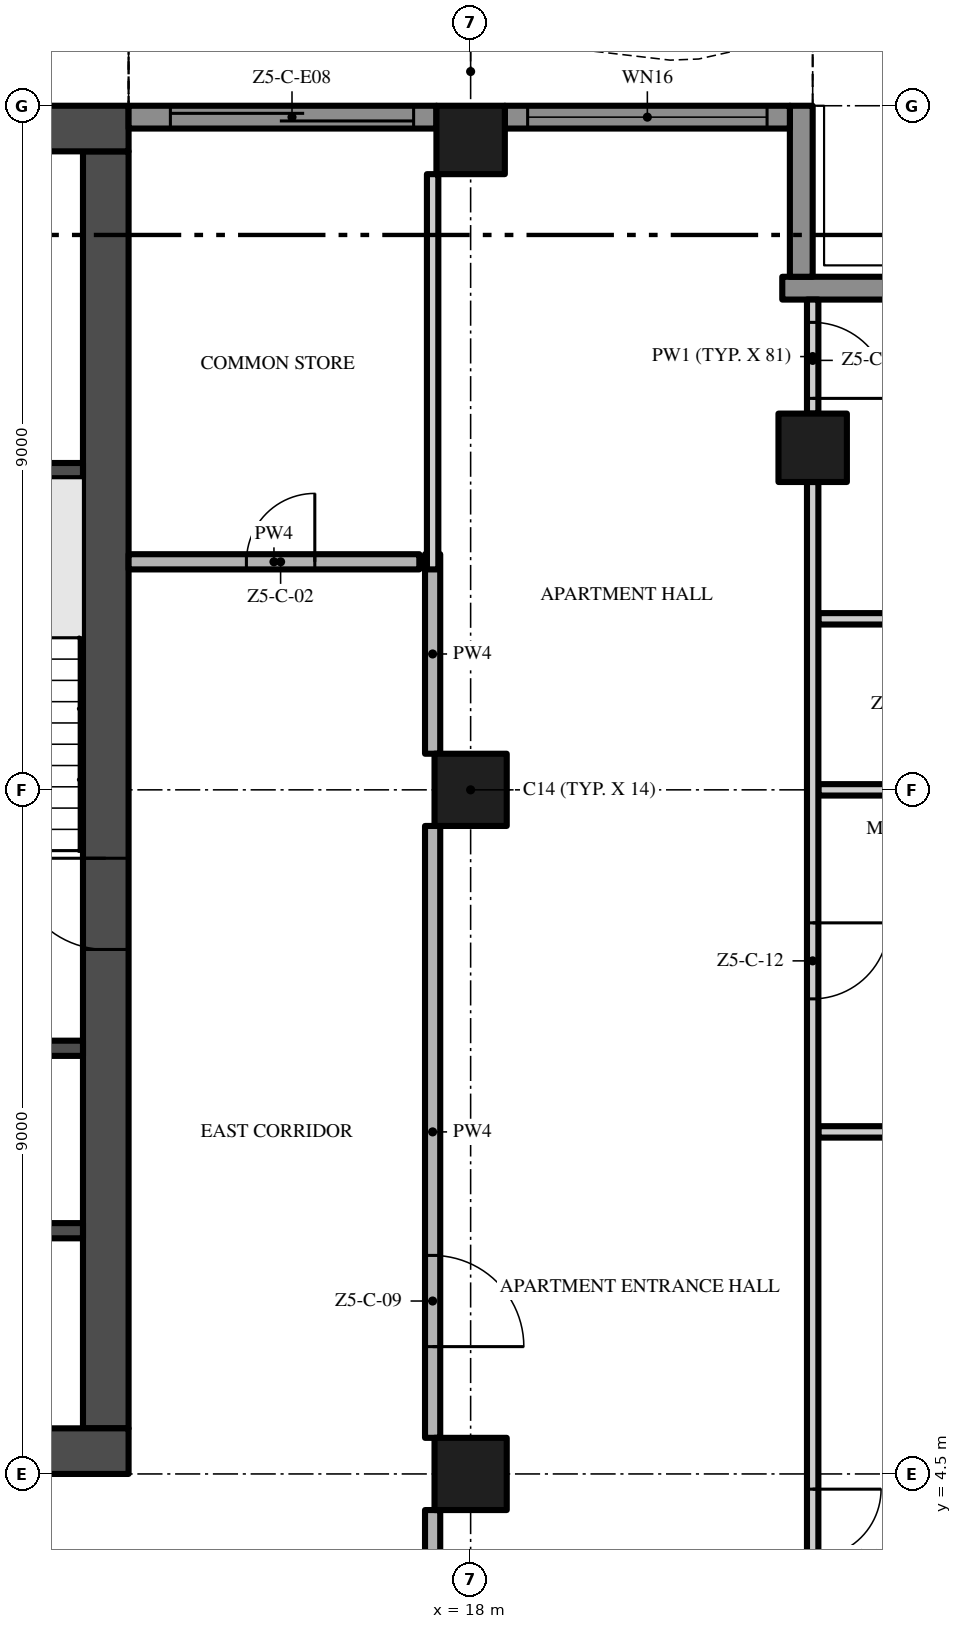
"""IFC4 building model, lengths in metres.
Left out: names, types, materials, properties, quantities, classifications, styles, units other than length and angle.
Written with IfcOpenShell. Run it as: python <this file> out.ifc"""

import sys

from ifc_helpers import new_model, si_unit, direction, frame, frame_2d, origin, origin_2d, place, context, subcontext, project, spatial, polyline, rectangle, outline, extrude, element, fill, save


model = new_model("IFC4")
c1 = context("Model", 3, precision=1e-05, world=origin(), true_north=direction((0.0, 1.0)))
c2 = subcontext(c1, "Body", "Model", "MODEL_VIEW")
j1 = project(units=[si_unit("LENGTHUNIT", "METRE"), si_unit("PLANEANGLEUNIT", "RADIAN")], contexts=[c1])
p1 = place(None, origin())
s1 = spatial("IfcSite", under=j1, at=p1, CompositionType="ELEMENT")
p2 = place(p1, origin())
s2 = spatial("IfcBuilding", under=s1, at=p2, CompositionType="ELEMENT")
p3 = place(p2, frame((0.0, 0.0, 261.6)))
s3 = spatial("IfcBuildingStorey", under=s2, at=p3, CompositionType="ELEMENT", Elevation=261.6)
p4 = place(p3, frame((-13.5, 4.8, -0.3), z_axis=(0.0, 0.0, 1.0), x_axis=(1.0, 0.0, 0.0)))
e1 = element("IfcWall", 1, at=p4, inside=s3, PredefinedType="SHEAR", context=c2, shape_type="SweptSolid", body=[
    extrude(rectangle(XDim=27.0, YDim=0.6, at=frame_2d((13.5, 0.0))), origin(), (0.0, 0.0, 1.0), 3.8),
])
p5 = place(p4, frame((12.0, 0.0, 0.3)))
e2 = element("IfcOpeningElement", 2, at=p5, cuts=e1, PredefinedType="OPENING", context=c2, shape_type="SweptSolid", body=[
    extrude(rectangle(XDim=3.0, YDim=2.4, at=frame_2d((1.5, 1.2))), frame((0.0, 0.31, 0.0), z_axis=(0.0, -1.0, 0.0), x_axis=(1.0, 0.0, 0.0)), (0.0, 0.0, 1.0), 0.62),
])
p6 = place(p4, frame((4.9, 0.0, 0.3)))
e3 = element("IfcOpeningElement", 3, at=p6, cuts=e1, PredefinedType="OPENING", context=c2, shape_type="SweptSolid", body=[
    extrude(rectangle(XDim=1.2, YDim=2.2, at=frame_2d((0.6, 1.1))), frame((0.0, 0.31, 0.0), z_axis=(0.0, -1.0, 0.0), x_axis=(1.0, 0.0, 0.0)), (0.0, 0.0, 1.0), 0.62),
])
p7 = place(p4, frame((20.75, 0.0, 0.3)))
e4 = element("IfcOpeningElement", 4, at=p7, cuts=e1, PredefinedType="OPENING", context=c2, shape_type="SweptSolid", body=[
    extrude(rectangle(XDim=1.5, YDim=2.2, at=frame_2d((0.75, 1.1))), frame((0.0, 0.31, 0.0), z_axis=(0.0, -1.0, 0.0), x_axis=(1.0, 0.0, 0.0)), (0.0, 0.0, 1.0), 0.62),
])
p8 = place(p4, frame((17.4, 0.0, 0.3)))
e5 = element("IfcOpeningElement", 5, at=p8, cuts=e1, PredefinedType="OPENING", context=c2, shape_type="SweptSolid", body=[
    extrude(rectangle(XDim=1.2, YDim=2.2, at=frame_2d((0.6, 1.1))), frame((0.0, 0.31, 0.0), z_axis=(0.0, -1.0, 0.0), x_axis=(1.0, 0.0, 0.0)), (0.0, 0.0, 1.0), 0.62),
])
p9 = place(p3, frame((13.2, 5.1, -0.3), z_axis=(0.0, 0.0, 1.0), x_axis=(0.0, 1.0, 0.0)))
e6 = element("IfcWall", 6, at=p9, inside=s3, PredefinedType="SHEAR", context=c2, shape_type="SweptSolid", body=[
    extrude(rectangle(XDim=16.8, YDim=0.6, at=frame_2d((8.4, 0.0))), origin(), (0.0, 0.0, 1.0), 3.8),
])
p10 = place(p9, frame((6.3, 0.0, 0.3)))
e7 = element("IfcOpeningElement", 7, at=p10, cuts=e6, PredefinedType="OPENING", context=c2, shape_type="SweptSolid", body=[
    extrude(rectangle(XDim=1.2, YDim=2.2, at=frame_2d((0.6, 1.1))), frame((0.0, 0.31, 0.0), z_axis=(0.0, -1.0, 0.0), x_axis=(1.0, 0.0, 0.0)), (0.0, 0.0, 1.0), 0.62),
])
p11 = place(p3, frame((13.5, 22.2, -0.3), z_axis=(0.0, 0.0, 1.0), x_axis=(-1.0, 0.0, 0.0)))
e8 = element("IfcWall", 8, at=p11, inside=s3, PredefinedType="SHEAR", context=c2, shape_type="SweptSolid", body=[
    extrude(rectangle(XDim=27.0, YDim=0.6, at=frame_2d((13.5, 0.0))), origin(), (0.0, 0.0, 1.0), 3.8),
])
p12 = place(p3, frame((18.0, 13.5, 0.0), z_axis=(0.0, 0.0, 1.0), x_axis=(1.0, 0.0, 0.0)))
e9 = element("IfcColumn", 9, at=p12, inside=s3, PredefinedType="COLUMN", context=c2, shape_type="SweptSolid", body=[
    extrude(rectangle(XDim=0.95, YDim=0.95, at=origin_2d()), origin(), (0.0, 0.0, 1.0), 3.5),
])
p13 = place(p3, frame((18.0, 22.05, 0.0), z_axis=(0.0, 0.0, 1.0), x_axis=(1.0, 0.0, 0.0)))
e10 = element("IfcColumn", 10, at=p13, inside=s3, PredefinedType="COLUMN", context=c2, shape_type="SweptSolid", body=[
    extrude(rectangle(XDim=0.9, YDim=0.9, at=origin_2d()), origin(), (0.0, 0.0, 1.0), 3.5),
])
p14 = place(p3, frame((18.0, 4.5, 0.0), z_axis=(0.0, 0.0, 1.0), x_axis=(1.0, 0.0, 0.0)))
e11 = element("IfcColumn", 11, at=p14, inside=s3, PredefinedType="COLUMN", context=c2, shape_type="SweptSolid", body=[
    extrude(rectangle(XDim=0.95, YDim=0.95, at=origin_2d()), origin(), (0.0, 0.0, 1.0), 3.5),
])
p15 = place(p3, frame((22.5, 18.0, 0.0), z_axis=(0.0, 0.0, 1.0), x_axis=(1.0, 0.0, 0.0)))
e12 = element("IfcColumn", 12, at=p15, inside=s3, PredefinedType="COLUMN", context=c2, shape_type="SweptSolid", body=[
    extrude(rectangle(XDim=0.9, YDim=0.9, at=origin_2d()), origin(), (0.0, 0.0, 1.0), 3.5),
])
p16 = place(p3, frame((22.1, 20.1, 0.0), z_axis=(0.0, 0.0, 1.0), x_axis=(1.0, 0.0, 0.0)))
e13 = element("IfcWall", 13, at=p16, inside=s3, PredefinedType="SOLIDWALL", context=c2, shape_type="SweptSolid", body=[
    extrude(rectangle(XDim=2.35, YDim=0.3, at=frame_2d((1.175, 0.0))), origin(), (0.0, 0.0, 1.0), 3.5),
])
p17 = place(p3, frame((22.35, 22.5, 0.0), z_axis=(0.0, 0.0, 1.0), x_axis=(0.0, -1.0, 0.0)))
e14 = element("IfcWall", 14, at=p17, inside=s3, PredefinedType="SOLIDWALL", context=c2, shape_type="SweptSolid", body=[
    extrude(rectangle(XDim=2.25, YDim=0.3, at=frame_2d((1.125, 0.0))), origin(), (0.0, 0.0, 1.0), 3.5),
])
p18 = place(p3, frame((18.45, 22.35, 0.0), z_axis=(0.0, 0.0, 1.0), x_axis=(1.0, 0.0, 0.0)))
e15 = element("IfcWall", 15, at=p18, inside=s3, PredefinedType="SOLIDWALL", context=c2, shape_type="SweptSolid", body=[
    extrude(rectangle(XDim=3.75, YDim=0.3, at=frame_2d((1.875, 0.0))), origin(), (0.0, 0.0, 1.0), 3.5),
])
p19 = place(p18, frame((0.3, 0.0, 0.45)))
e16 = element("IfcOpeningElement", 16, at=p19, cuts=e15, PredefinedType="OPENING", context=c2, shape_type="SweptSolid", body=[
    extrude(rectangle(XDim=3.15, YDim=2.65, at=frame_2d((1.575, 1.325))), frame((0.0, 0.16, 0.0), z_axis=(0.0, -1.0, 0.0), x_axis=(1.0, 0.0, 0.0)), (0.0, 0.0, 1.0), 0.32),
])
p20 = place(p3, frame((13.5, 22.35, 0.0), z_axis=(0.0, 0.0, 1.0), x_axis=(1.0, 0.0, 0.0)))
e17 = element("IfcWall", 17, at=p20, inside=s3, PredefinedType="SOLIDWALL", context=c2, shape_type="SweptSolid", body=[
    extrude(rectangle(XDim=4.05, YDim=0.3, at=frame_2d((2.025, 0.0))), origin(), (0.0, 0.0, 1.0), 3.5),
])
p21 = place(p20, frame((0.55, 0.0, 0.0)))
e18 = element("IfcOpeningElement", 18, at=p21, cuts=e17, PredefinedType="OPENING", context=c2, shape_type="SweptSolid", body=[
    extrude(rectangle(XDim=3.2, YDim=2.4, at=frame_2d((1.6, 1.2))), frame((0.0, 0.16, 0.0), z_axis=(0.0, -1.0, 0.0), x_axis=(1.0, 0.0, 0.0)), (0.0, 0.0, 1.0), 0.32),
])
p22 = place(p3, origin())
e19 = element("IfcWall", 19, at=p22, inside=s3, PredefinedType="USERDEFINED", context=c2, shape_type="SweptSolid", body=[
    extrude(outline(polyline([(22.5, 23.451), (21.0, 23.115), (20.625, 23.1), (19.5, 23.231), (18.0, 23.755), (16.5, 24.488), (15.0, 25.149), (13.5, 25.485), (13.445, 25.241), (14.921, 24.91), (16.395, 24.261), (17.904, 23.524), (19.444, 22.986), (20.615, 22.849), (21.033, 22.866), (22.555, 23.208), (22.5, 23.451)])), origin(), (0.0, 0.0, 1.0), 0.9),
])
for number, where, z_axis, x_axis in (
    (20, (9.65, 7.7, 0.0), (0.0, 0.0, 1.0), (1.0, 0.0, 0.0)),
    (21, (9.65, 10.1, 0.0), (0.0, 0.0, 1.0), (1.0, 0.0, 0.0)),
    (22, (9.65, 17.7, 0.0), (0.0, 0.0, 1.0), (1.0, 0.0, 0.0)),
):
    element("IfcWall", number, at=place(p3, frame(where, z_axis=z_axis, x_axis=x_axis)), inside=s3, PredefinedType="SHEAR", context=c2, shape_type="SweptSolid", body=[
        extrude(rectangle(XDim=3.25, YDim=0.2, at=frame_2d((1.625, 0.0))), origin(), (0.0, 0.0, 1.0), 3.5),
    ])
p23 = place(p3, frame((22.575, 9.0, 0.0), z_axis=(0.0, 0.0, 1.0), x_axis=(1.0, 0.0, 0.0)))
e23 = element("IfcWall", 23, at=p23, inside=s3, PredefinedType="PARTITIONING", context=c2, shape_type="SweptSolid", body=[
    extrude(rectangle(XDim=4.125, YDim=0.15, at=frame_2d((2.062, 0.0))), origin(), (0.0, 0.0, 1.0), 3.5),
])
p24 = place(p3, frame((22.575, 13.5, 0.0), z_axis=(0.0, 0.0, 1.0), x_axis=(1.0, 0.0, 0.0)))
e24 = element("IfcWall", 24, at=p24, inside=s3, PredefinedType="PARTITIONING", context=c2, shape_type="SweptSolid", body=[
    extrude(rectangle(XDim=3.525, YDim=0.15, at=frame_2d((1.762, 0.0))), origin(), (0.0, 0.0, 1.0), 3.5),
])
p25 = place(p3, frame((22.575, 15.75, 0.0), z_axis=(0.0, 0.0, 1.0), x_axis=(1.0, 0.0, 0.0)))
e25 = element("IfcWall", 25, at=p25, inside=s3, PredefinedType="PARTITIONING", context=c2, shape_type="SweptSolid", body=[
    extrude(rectangle(XDim=1.875, YDim=0.15, at=frame_2d((0.938, 0.0))), origin(), (0.0, 0.0, 1.0), 3.5),
])
p26 = place(p3, frame((13.5, 16.5, 0.0), z_axis=(0.0, 0.0, 1.0), x_axis=(1.0, 0.0, 0.0)))
e26 = element("IfcWall", 26, at=p26, inside=s3, PredefinedType="PARTITIONING", context=c2, shape_type="SweptSolid", body=[
    extrude(rectangle(XDim=3.825, YDim=0.2, at=frame_2d((1.913, 0.0))), origin(), (0.0, 0.0, 1.0), 3.5),
])
p27 = place(p26, frame((1.55, 0.0, 0.0)))
e27 = element("IfcOpeningElement", 27, at=p27, cuts=e26, PredefinedType="OPENING", context=c2, shape_type="SweptSolid", body=[
    extrude(rectangle(XDim=0.9, YDim=2.1, at=frame_2d((0.45, 1.05))), frame((0.0, 0.11, 0.0), z_axis=(0.0, -1.0, 0.0), x_axis=(1.0, 0.0, 0.0)), (0.0, 0.0, 1.0), 0.22),
])
p28 = place(p3, frame((17.5, -0.2, 0.0), z_axis=(0.0, 0.0, 1.0), x_axis=(0.0, 1.0, 0.0)))
e28 = element("IfcWall", 28, at=p28, inside=s3, PredefinedType="PARTITIONING", context=c2, shape_type="SweptSolid", body=[
    extrude(rectangle(XDim=4.225, YDim=0.2, at=frame_2d((2.112, 0.0))), origin(), (0.0, 0.0, 1.0), 3.5),
])
p29 = place(p3, frame((17.5, 13.025, 0.0), z_axis=(0.0, 0.0, 1.0), x_axis=(0.0, -1.0, 0.0)))
e29 = element("IfcWall", 29, at=p29, inside=s3, PredefinedType="PARTITIONING", context=c2, shape_type="SweptSolid", body=[
    extrude(rectangle(XDim=8.05, YDim=0.2, at=frame_2d((4.025, 0.0))), origin(), (0.0, 0.0, 1.0), 3.5),
])
p30 = place(p29, frame((5.65, 0.0, 0.0)))
e30 = element("IfcOpeningElement", 30, at=p30, cuts=e29, PredefinedType="OPENING", context=c2, shape_type="SweptSolid", body=[
    extrude(rectangle(XDim=1.2, YDim=2.4, at=frame_2d((0.6, 1.2))), frame((0.0, 0.11, 0.0), z_axis=(0.0, -1.0, 0.0), x_axis=(1.0, 0.0, 0.0)), (0.0, 0.0, 1.0), 0.22),
])
p31 = place(p3, frame((17.5, 13.975, 0.0), z_axis=(0.0, 0.0, 1.0), x_axis=(0.0, 1.0, 0.0)))
e31 = element("IfcWall", 31, at=p31, inside=s3, PredefinedType="PARTITIONING", context=c2, shape_type="SweptSolid", body=[
    extrude(rectangle(XDim=2.625, YDim=0.2, at=frame_2d((1.312, 0.0))), origin(), (0.0, 0.0, 1.0), 3.5),
])
p32 = place(p3, frame((17.5, 16.4, 0.0), z_axis=(0.0, 0.0, 1.0), x_axis=(0.0, 1.0, 0.0)))
e32 = element("IfcWall", 32, at=p32, inside=s3, PredefinedType="PARTITIONING", context=c2, shape_type="SweptSolid", body=[
    extrude(rectangle(XDim=5.2, YDim=0.15, at=frame_2d((2.6, 0.0))), origin(), (0.0, 0.0, 1.0), 3.5),
])
p33 = place(p3, frame((22.5, 17.55, 0.0), z_axis=(0.0, 0.0, 1.0), x_axis=(0.0, -1.0, 0.0)))
e33 = element("IfcWall", 33, at=p33, inside=s3, PredefinedType="PARTITIONING", context=c2, shape_type="SweptSolid", body=[
    extrude(rectangle(XDim=17.45, YDim=0.15, at=frame_2d((8.725, 0.0))), origin(), (0.0, 0.0, 1.0), 3.5),
])
p34 = place(p33, frame((13.25, 0.0, 0.0)))
e34 = element("IfcOpeningElement", 34, at=p34, cuts=e33, PredefinedType="OPENING", context=c2, shape_type="SweptSolid", body=[
    extrude(rectangle(XDim=1.8, YDim=2.4, at=frame_2d((0.9, 1.2))), frame((0.0, 0.085, 0.0), z_axis=(0.0, -1.0, 0.0), x_axis=(1.0, 0.0, 0.0)), (0.0, 0.0, 1.0), 0.17),
])
p35 = place(p33, frame((5.8, 0.0, 0.0)))
e35 = element("IfcOpeningElement", 35, at=p35, cuts=e33, PredefinedType="OPENING", context=c2, shape_type="SweptSolid", body=[
    extrude(rectangle(XDim=1.0, YDim=2.4, at=frame_2d((0.5, 1.2))), frame((0.0, 0.085, 0.0), z_axis=(0.0, -1.0, 0.0), x_axis=(1.0, 0.0, 0.0)), (0.0, 0.0, 1.0), 0.17),
])
p36 = place(p3, frame((22.5, 19.95, 0.0), z_axis=(0.0, 0.0, 1.0), x_axis=(0.0, -1.0, 0.0)))
e36 = element("IfcWall", 36, at=p36, inside=s3, PredefinedType="PARTITIONING", context=c2, shape_type="SweptSolid", body=[
    extrude(rectangle(XDim=1.5, YDim=0.15, at=frame_2d((0.75, 0.0))), origin(), (0.0, 0.0, 1.0), 3.5),
])
p37 = place(p36, frame((0.3, 0.0, 0.0)))
e37 = element("IfcOpeningElement", 37, at=p37, cuts=e36, PredefinedType="OPENING", context=c2, shape_type="SweptSolid", body=[
    extrude(rectangle(XDim=1.0, YDim=2.4, at=frame_2d((0.5, 1.2))), frame((0.0, 0.085, 0.0), z_axis=(0.0, -1.0, 0.0), x_axis=(1.0, 0.0, 0.0)), (0.0, 0.0, 1.0), 0.17),
])
p38 = place(p19, origin())
e38 = element("IfcWindow", 38, at=p38, inside=s3, PartitioningType="SINGLE_PANEL", PredefinedType="WINDOW", context=c2, shape_type="SweptSolid", body=[
    extrude(rectangle(XDim=3.15, YDim=2.65, at=frame_2d((1.575, 1.325))), frame((0.0, 0.03, 0.0), z_axis=(0.0, -1.0, 0.0), x_axis=(1.0, 0.0, 0.0)), (0.0, 0.0, 1.0), 0.06),
])
fill(e16, e38)
p39 = place(p21, origin())
e39 = element("IfcDoor", 39, at=p39, inside=s3, OperationType="SINGLE_SWING_LEFT", PredefinedType="DOOR", context=c2, shape_type="SweptSolid", body=[
    extrude(rectangle(XDim=3.2, YDim=2.4, at=frame_2d((1.6, 1.2))), frame((0.0, 0.025, 0.0), z_axis=(0.0, -1.0, 0.0), x_axis=(1.0, 0.0, 0.0)), (0.0, 0.0, 1.0), 0.05),
])
fill(e18, e39)
p40 = place(p10, frame((1.2, 0.0, 0.0), z_axis=(0.0, 0.0, 1.0), x_axis=(-1.0, 0.0, 0.0)))
e40 = element("IfcDoor", 40, at=p40, inside=s3, OperationType="SINGLE_SWING_LEFT", PredefinedType="DOOR", context=c2, shape_type="SweptSolid", body=[
    extrude(rectangle(XDim=1.2, YDim=2.2, at=frame_2d((0.6, 1.1))), frame((0.0, 0.025, 0.0), z_axis=(0.0, -1.0, 0.0), x_axis=(1.0, 0.0, 0.0)), (0.0, 0.0, 1.0), 0.05),
])
fill(e7, e40)
p41 = place(p27, origin())
e41 = element("IfcDoor", 41, at=p41, inside=s3, OperationType="SINGLE_SWING_RIGHT", PredefinedType="DOOR", context=c2, shape_type="SweptSolid", body=[
    extrude(rectangle(XDim=0.9, YDim=2.1, at=frame_2d((0.45, 1.05))), frame((0.0, 0.025, 0.0), z_axis=(0.0, -1.0, 0.0), x_axis=(1.0, 0.0, 0.0)), (0.0, 0.0, 1.0), 0.05),
])
fill(e27, e41)
p42 = place(p30, origin())
e42 = element("IfcDoor", 42, at=p42, inside=s3, OperationType="SINGLE_SWING_RIGHT", PredefinedType="DOOR", context=c2, shape_type="SweptSolid", body=[
    extrude(rectangle(XDim=1.2, YDim=2.4, at=frame_2d((0.6, 1.2))), frame((0.0, 0.025, 0.0), z_axis=(0.0, -1.0, 0.0), x_axis=(1.0, 0.0, 0.0)), (0.0, 0.0, 1.0), 0.05),
])
fill(e30, e42)
p43 = place(p34, origin())
e43 = element("IfcDoor", 43, at=p43, inside=s3, OperationType="DOUBLE_DOOR_SINGLE_SWING", PredefinedType="DOOR", context=c2, shape_type="SweptSolid", body=[
    extrude(rectangle(XDim=1.8, YDim=2.4, at=frame_2d((0.9, 1.2))), frame((0.0, 0.025, 0.0), z_axis=(0.0, -1.0, 0.0), x_axis=(1.0, 0.0, 0.0)), (0.0, 0.0, 1.0), 0.05),
])
fill(e34, e43)
p44 = place(p35, origin())
e44 = element("IfcDoor", 44, at=p44, inside=s3, OperationType="SINGLE_SWING_LEFT", PredefinedType="DOOR", context=c2, shape_type="SweptSolid", body=[
    extrude(rectangle(XDim=1.0, YDim=2.4, at=frame_2d((0.5, 1.2))), frame((0.0, 0.025, 0.0), z_axis=(0.0, -1.0, 0.0), x_axis=(1.0, 0.0, 0.0)), (0.0, 0.0, 1.0), 0.05),
])
fill(e35, e44)
p45 = place(p37, origin())
e45 = element("IfcDoor", 45, at=p45, inside=s3, OperationType="SINGLE_SWING_RIGHT", PredefinedType="DOOR", context=c2, shape_type="SweptSolid", body=[
    extrude(rectangle(XDim=1.0, YDim=2.4, at=frame_2d((0.5, 1.2))), frame((0.0, 0.025, 0.0), z_axis=(0.0, -1.0, 0.0), x_axis=(1.0, 0.0, 0.0)), (0.0, 0.0, 1.0), 0.05),
])
fill(e37, e45)
save(model, sys.argv[1])
